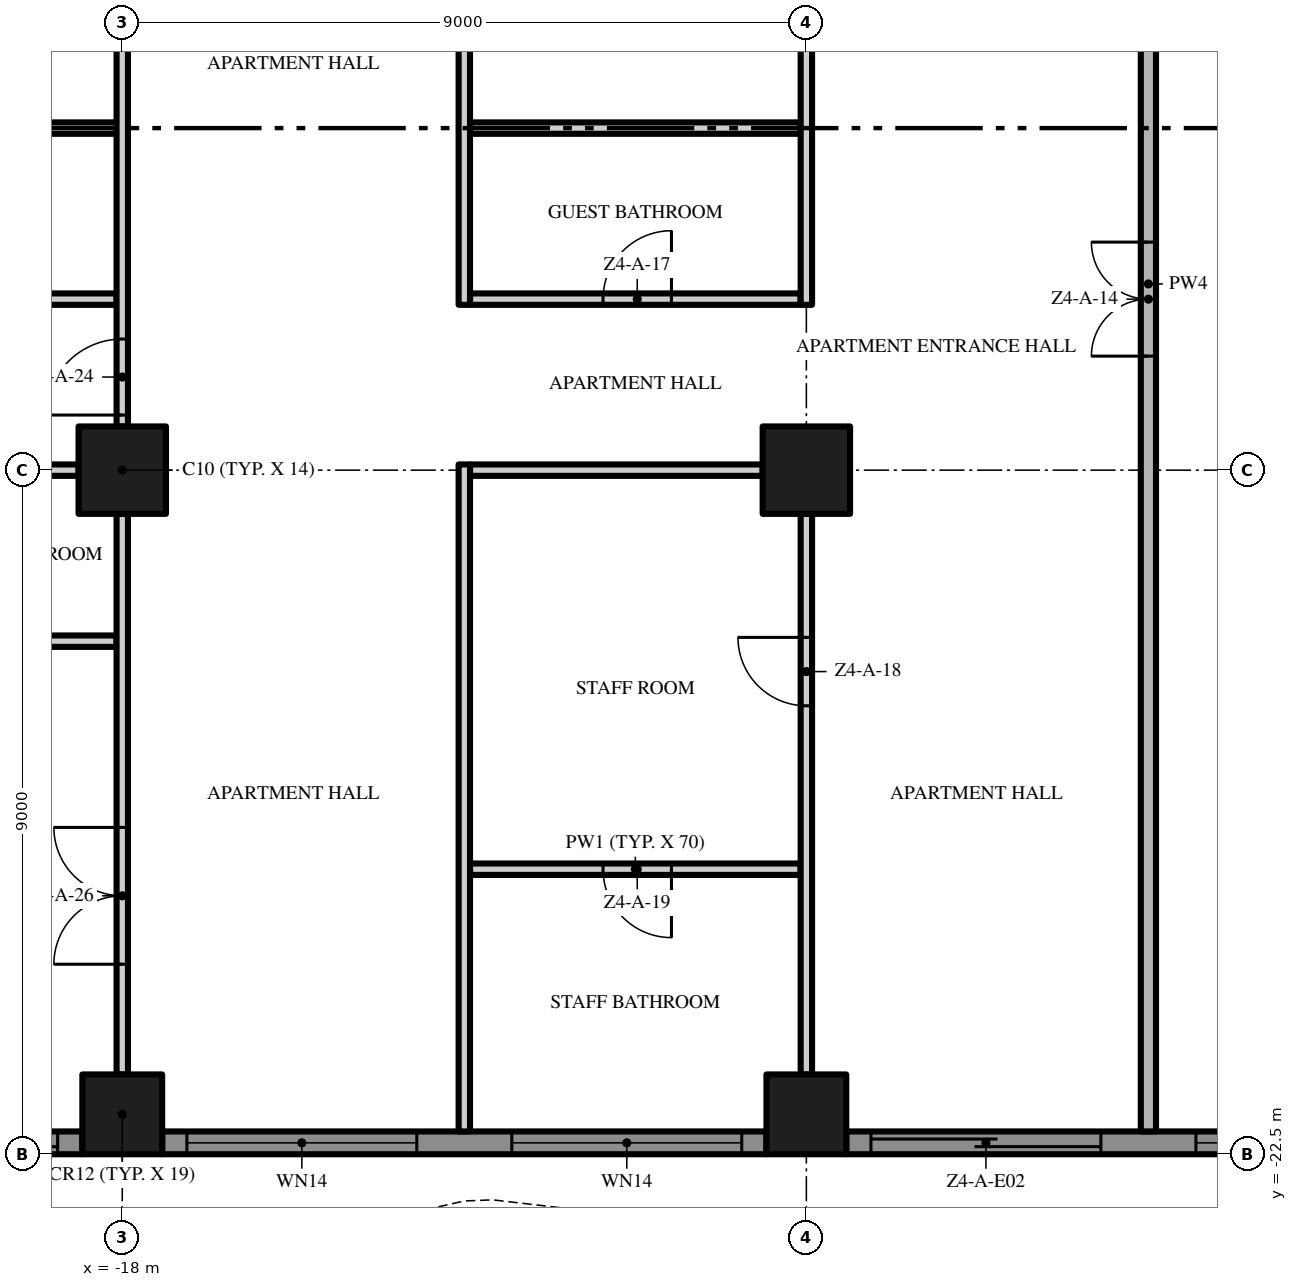
"""IFC4 building model, lengths in metres.
Left out: names, types, materials, properties, quantities, classifications, styles, units other than length and angle.
Written with IfcOpenShell. Run it as: python <this file> out.ifc"""

import sys

from ifc_helpers import new_model, si_unit, direction, frame, frame_2d, origin, origin_2d, place, context, subcontext, project, spatial, polyline, rectangle, outline, extrude, element, fill, save


model = new_model("IFC4")
c1 = context("Model", 3, precision=1e-05, world=origin(), true_north=direction((0.0, 1.0)))
c2 = subcontext(c1, "Body", "Model", "MODEL_VIEW")
j1 = project(units=[si_unit("LENGTHUNIT", "METRE"), si_unit("PLANEANGLEUNIT", "RADIAN")], contexts=[c1])
p1 = place(None, origin())
s1 = spatial("IfcSite", under=j1, at=p1, CompositionType="ELEMENT")
p2 = place(p1, origin())
s2 = spatial("IfcBuilding", under=s1, at=p2, CompositionType="ELEMENT")
p3 = place(p2, frame((0.0, 0.0, 184.4)))
s3 = spatial("IfcBuildingStorey", under=s2, at=p3, CompositionType="ELEMENT", Elevation=184.4)
p4 = place(p3, frame((-18.0, -13.5, 0.0), z_axis=(0.0, 0.0, 1.0), x_axis=(1.0, 0.0, 0.0)))
e1 = element("IfcColumn", 1, at=p4, inside=s3, PredefinedType="COLUMN", context=c2, shape_type="SweptSolid", body=[
    extrude(rectangle(XDim=1.15, YDim=1.15, at=origin_2d()), origin(), (0.0, 0.0, 1.0), 3.5),
])
p5 = place(p3, frame((-18.0, -21.975, 0.0), z_axis=(0.0, 0.0, 1.0), x_axis=(1.0, 0.0, 0.0)))
e2 = element("IfcColumn", 2, at=p5, inside=s3, PredefinedType="COLUMN", context=c2, shape_type="SweptSolid", body=[
    extrude(rectangle(XDim=1.05, YDim=1.05, at=origin_2d()), origin(), (0.0, 0.0, 1.0), 3.5),
])
p6 = place(p3, frame((-9.0, -13.5, 0.0), z_axis=(0.0, 0.0, 1.0), x_axis=(1.0, 0.0, 0.0)))
e3 = element("IfcColumn", 3, at=p6, inside=s3, PredefinedType="COLUMN", context=c2, shape_type="SweptSolid", body=[
    extrude(rectangle(XDim=1.15, YDim=1.15, at=origin_2d()), origin(), (0.0, 0.0, 1.0), 3.5),
])
p7 = place(p3, frame((-9.0, -21.975, 0.0), z_axis=(0.0, 0.0, 1.0), x_axis=(1.0, 0.0, 0.0)))
e4 = element("IfcColumn", 4, at=p7, inside=s3, PredefinedType="COLUMN", context=c2, shape_type="SweptSolid", body=[
    extrude(rectangle(XDim=1.05, YDim=1.05, at=origin_2d()), origin(), (0.0, 0.0, 1.0), 3.5),
])
p8 = place(p3, frame((-18.525, -22.35, 0.0), z_axis=(0.0, 0.0, 1.0), x_axis=(-1.0, 0.0, 0.0)))
e5 = element("IfcWall", 5, at=p8, inside=s3, PredefinedType="SOLIDWALL", context=c2, shape_type="SweptSolid", body=[
    extrude(rectangle(XDim=3.675, YDim=0.3, at=frame_2d((1.837, 0.0))), origin(), (0.0, 0.0, 1.0), 3.5),
])
p9 = place(p8, frame((0.325, 0.0, 0.0)))
e6 = element("IfcOpeningElement", 6, at=p9, cuts=e5, PredefinedType="OPENING", context=c2, shape_type="SweptSolid", body=[
    extrude(rectangle(XDim=3.025, YDim=2.4, at=frame_2d((1.512, 1.2))), frame((0.0, 0.16, 0.0), z_axis=(0.0, -1.0, 0.0), x_axis=(1.0, 0.0, 0.0)), (0.0, 0.0, 1.0), 0.32),
])
p10 = place(p3, frame((-9.525, -22.35, 0.0), z_axis=(0.0, 0.0, 1.0), x_axis=(-1.0, 0.0, 0.0)))
e7 = element("IfcWall", 7, at=p10, inside=s3, PredefinedType="SOLIDWALL", context=c2, shape_type="SweptSolid", body=[
    extrude(rectangle(XDim=7.95, YDim=0.3, at=frame_2d((3.975, 0.0))), origin(), (0.0, 0.0, 1.0), 3.5),
])
p11 = place(p10, frame((4.6, 0.0, 0.45)))
e8 = element("IfcOpeningElement", 8, at=p11, cuts=e7, PredefinedType="OPENING", context=c2, shape_type="SweptSolid", body=[
    extrude(rectangle(XDim=3.025, YDim=2.65, at=frame_2d((1.512, 1.325))), frame((0.0, 0.16, 0.0), z_axis=(0.0, -1.0, 0.0), x_axis=(1.0, 0.0, 0.0)), (0.0, 0.0, 1.0), 0.32),
])
p12 = place(p10, frame((0.325, 0.0, 0.45)))
e9 = element("IfcOpeningElement", 9, at=p12, cuts=e7, PredefinedType="OPENING", context=c2, shape_type="SweptSolid", body=[
    extrude(rectangle(XDim=3.025, YDim=2.65, at=frame_2d((1.512, 1.325))), frame((0.0, 0.16, 0.0), z_axis=(0.0, -1.0, 0.0), x_axis=(1.0, 0.0, 0.0)), (0.0, 0.0, 1.0), 0.32),
])
p13 = place(p3, frame((-0.525, -22.35, 0.0), z_axis=(0.0, 0.0, 1.0), x_axis=(-1.0, 0.0, 0.0)))
e10 = element("IfcWall", 10, at=p13, inside=s3, PredefinedType="SOLIDWALL", context=c2, shape_type="SweptSolid", body=[
    extrude(rectangle(XDim=7.95, YDim=0.3, at=frame_2d((3.975, 0.0))), origin(), (0.0, 0.0, 1.0), 3.5),
])
p14 = place(p13, frame((4.6, 0.0, 0.0)))
e11 = element("IfcOpeningElement", 11, at=p14, cuts=e10, PredefinedType="OPENING", context=c2, shape_type="SweptSolid", body=[
    extrude(rectangle(XDim=3.025, YDim=2.4, at=frame_2d((1.512, 1.2))), frame((0.0, 0.16, 0.0), z_axis=(0.0, -1.0, 0.0), x_axis=(1.0, 0.0, 0.0)), (0.0, 0.0, 1.0), 0.32),
])
p15 = place(p13, frame((0.325, 0.0, 0.45)))
e12 = element("IfcOpeningElement", 12, at=p15, cuts=e10, PredefinedType="OPENING", context=c2, shape_type="SweptSolid", body=[
    extrude(rectangle(XDim=3.025, YDim=2.65, at=frame_2d((1.512, 1.325))), frame((0.0, 0.16, 0.0), z_axis=(0.0, -1.0, 0.0), x_axis=(1.0, 0.0, 0.0)), (0.0, 0.0, 1.0), 0.32),
])
p16 = place(p3, origin())
e13 = element("IfcWall", 13, at=p16, inside=s3, PredefinedType="USERDEFINED", context=c2, shape_type="SweptSolid", body=[
    extrude(outline(polyline([(-22.5, -25.149), (-21.0, -25.485), (-20.625, -25.5), (-19.5, -25.369), (-18.0, -24.845), (-16.5, -24.112), (-15.0, -23.451), (-13.5, -23.115), (-13.125, -23.1), (-12.0, -23.231), (-10.5, -23.755), (-9.0, -24.488), (-7.5, -25.149), (-6.0, -25.485), (-5.625, -25.5), (-4.5, -25.369), (-3.0, -24.845), (-1.5, -24.112), (0.0, -23.451), (1.5, -23.115), (1.875, -23.1), (3.0, -23.231), (4.5, -23.755), (6.0, -24.488), (7.5, -25.149), (9.0, -25.485), (9.375, -25.5), (10.5, -25.369), (12.0, -24.845), (13.5, -24.112), (15.0, -23.451), (16.5, -23.115), (16.875, -23.1), (18.0, -23.231), (19.5, -23.755), (21.0, -24.488), (22.5, -25.149), (22.601, -24.92), (21.105, -24.261), (19.596, -23.524), (18.056, -22.986), (16.885, -22.849), (16.467, -22.866), (14.921, -23.213), (13.395, -23.885), (11.904, -24.614), (10.444, -25.124), (9.365, -25.249), (9.033, -25.236), (7.579, -24.91), (6.105, -24.261), (4.596, -23.524), (3.056, -22.986), (1.885, -22.849), (1.467, -22.866), (-0.079, -23.213), (-1.605, -23.885), (-3.096, -24.614), (-4.556, -25.124), (-5.635, -25.249), (-5.967, -25.236), (-7.421, -24.91), (-8.895, -24.261), (-10.404, -23.524), (-11.944, -22.986), (-13.115, -22.849), (-13.533, -22.866), (-15.079, -23.213), (-16.605, -23.885), (-18.096, -24.614), (-19.556, -25.124), (-20.635, -25.249), (-20.967, -25.236), (-22.445, -24.905), (-22.5, -25.149)])), origin(), (0.0, 0.0, 1.0), 0.9),
])
p17 = place(p3, frame((-9.075, -18.75, 0.0), z_axis=(0.0, 0.0, 1.0), x_axis=(-1.0, 0.0, 0.0)))
e14 = element("IfcWall", 14, at=p17, inside=s3, PredefinedType="PARTITIONING", context=c2, shape_type="SweptSolid", body=[
    extrude(rectangle(XDim=4.35, YDim=0.15, at=frame_2d((2.175, 0.0))), origin(), (0.0, 0.0, 1.0), 3.5),
])
p18 = place(p17, frame((1.7, 0.0, 0.0)))
e15 = element("IfcOpeningElement", 15, at=p18, cuts=e14, PredefinedType="OPENING", context=c2, shape_type="SweptSolid", body=[
    extrude(rectangle(XDim=0.9, YDim=2.1, at=frame_2d((0.45, 1.05))), frame((0.0, 0.085, 0.0), z_axis=(0.0, -1.0, 0.0), x_axis=(1.0, 0.0, 0.0)), (0.0, 0.0, 1.0), 0.17),
])
p19 = place(p3, frame((-20.925, -15.75, 0.0), z_axis=(0.0, 0.0, 1.0), x_axis=(1.0, 0.0, 0.0)))
e16 = element("IfcWall", 16, at=p19, inside=s3, PredefinedType="PARTITIONING", context=c2, shape_type="SweptSolid", body=[
    extrude(rectangle(XDim=2.85, YDim=0.15, at=frame_2d((1.425, 0.0))), origin(), (0.0, 0.0, 1.0), 3.5),
])
p20 = place(p3, frame((-25.95, -13.5, 0.0), z_axis=(0.0, 0.0, 1.0), x_axis=(1.0, 0.0, 0.0)))
e17 = element("IfcWall", 17, at=p20, inside=s3, PredefinedType="PARTITIONING", context=c2, shape_type="SweptSolid", body=[
    extrude(rectangle(XDim=7.375, YDim=0.15, at=frame_2d((3.688, 0.0))), origin(), (0.0, 0.0, 1.0), 3.5),
])
p21 = place(p3, frame((-13.425, -13.5, 0.0), z_axis=(0.0, 0.0, 1.0), x_axis=(1.0, 0.0, 0.0)))
e18 = element("IfcWall", 18, at=p21, inside=s3, PredefinedType="PARTITIONING", context=c2, shape_type="SweptSolid", body=[
    extrude(rectangle(XDim=3.85, YDim=0.15, at=frame_2d((1.925, 0.0))), origin(), (0.0, 0.0, 1.0), 3.5),
])
p22 = place(p3, frame((-20.925, -11.25, 0.0), z_axis=(0.0, 0.0, 1.0), x_axis=(1.0, 0.0, 0.0)))
e19 = element("IfcWall", 19, at=p22, inside=s3, PredefinedType="PARTITIONING", context=c2, shape_type="SweptSolid", body=[
    extrude(rectangle(XDim=2.85, YDim=0.15, at=frame_2d((1.425, 0.0))), origin(), (0.0, 0.0, 1.0), 3.5),
])
p23 = place(p3, frame((-13.425, -11.25, 0.0), z_axis=(0.0, 0.0, 1.0), x_axis=(1.0, 0.0, 0.0)))
e20 = element("IfcWall", 20, at=p23, inside=s3, PredefinedType="PARTITIONING", context=c2, shape_type="SweptSolid", body=[
    extrude(rectangle(XDim=4.35, YDim=0.15, at=frame_2d((2.175, 0.0))), origin(), (0.0, 0.0, 1.0), 3.5),
])
p24 = place(p23, frame((1.75, 0.0, 0.0)))
e21 = element("IfcOpeningElement", 21, at=p24, cuts=e20, PredefinedType="OPENING", context=c2, shape_type="SweptSolid", body=[
    extrude(rectangle(XDim=0.9, YDim=2.1, at=frame_2d((0.45, 1.05))), frame((0.0, 0.085, 0.0), z_axis=(0.0, -1.0, 0.0), x_axis=(1.0, 0.0, 0.0)), (0.0, 0.0, 1.0), 0.17),
])
p25 = place(p3, frame((-20.925, -9.0, 0.0), z_axis=(0.0, 0.0, 1.0), x_axis=(1.0, 0.0, 0.0)))
e22 = element("IfcWall", 22, at=p25, inside=s3, PredefinedType="PARTITIONING", context=c2, shape_type="SweptSolid", body=[
    extrude(rectangle(XDim=2.85, YDim=0.15, at=frame_2d((1.425, 0.0))), origin(), (0.0, 0.0, 1.0), 3.5),
])
p26 = place(p3, frame((-13.425, -9.0, 0.0), z_axis=(0.0, 0.0, 1.0), x_axis=(1.0, 0.0, 0.0)))
e23 = element("IfcWall", 23, at=p26, inside=s3, PredefinedType="PARTITIONING", context=c2, shape_type="SweptSolid", body=[
    extrude(rectangle(XDim=4.35, YDim=0.15, at=frame_2d((2.175, 0.0))), origin(), (0.0, 0.0, 1.0), 3.5),
])
p27 = place(p3, frame((-18.0, -21.45, 0.0), z_axis=(0.0, 0.0, 1.0), x_axis=(0.0, 1.0, 0.0)))
e24 = element("IfcWall", 24, at=p27, inside=s3, PredefinedType="PARTITIONING", context=c2, shape_type="SweptSolid", body=[
    extrude(rectangle(XDim=7.375, YDim=0.15, at=frame_2d((3.688, 0.0))), origin(), (0.0, 0.0, 1.0), 3.5),
])
p28 = place(p27, frame((1.45, 0.0, 0.0)))
e25 = element("IfcOpeningElement", 25, at=p28, cuts=e24, PredefinedType="OPENING", context=c2, shape_type="SweptSolid", body=[
    extrude(rectangle(XDim=1.8, YDim=2.4, at=frame_2d((0.9, 1.2))), frame((0.0, 0.085, 0.0), z_axis=(0.0, -1.0, 0.0), x_axis=(1.0, 0.0, 0.0)), (0.0, 0.0, 1.0), 0.17),
])
p29 = place(p3, frame((-18.0, -12.925, 0.0), z_axis=(0.0, 0.0, 1.0), x_axis=(0.0, 1.0, 0.0)))
e26 = element("IfcWall", 26, at=p29, inside=s3, PredefinedType="PARTITIONING", context=c2, shape_type="SweptSolid", body=[
    extrude(rectangle(XDim=7.85, YDim=0.15, at=frame_2d((3.925, 0.0))), origin(), (0.0, 0.0, 1.0), 3.5),
])
p30 = place(p29, frame((6.7, 0.0, 0.0)))
e27 = element("IfcOpeningElement", 27, at=p30, cuts=e26, PredefinedType="OPENING", context=c2, shape_type="SweptSolid", body=[
    extrude(rectangle(XDim=1.0, YDim=2.4, at=frame_2d((0.5, 1.2))), frame((0.0, 0.085, 0.0), z_axis=(0.0, -1.0, 0.0), x_axis=(1.0, 0.0, 0.0)), (0.0, 0.0, 1.0), 0.17),
])
p31 = place(p29, frame((0.15, 0.0, 0.0)))
e28 = element("IfcOpeningElement", 28, at=p31, cuts=e26, PredefinedType="OPENING", context=c2, shape_type="SweptSolid", body=[
    extrude(rectangle(XDim=1.0, YDim=2.4, at=frame_2d((0.5, 1.2))), frame((0.0, 0.085, 0.0), z_axis=(0.0, -1.0, 0.0), x_axis=(1.0, 0.0, 0.0)), (0.0, 0.0, 1.0), 0.17),
])
p32 = place(p3, frame((-13.5, -22.2, 0.0), z_axis=(0.0, 0.0, 1.0), x_axis=(0.0, 1.0, 0.0)))
e29 = element("IfcWall", 29, at=p32, inside=s3, PredefinedType="PARTITIONING", context=c2, shape_type="SweptSolid", body=[
    extrude(rectangle(XDim=8.775, YDim=0.15, at=frame_2d((4.388, 0.0))), origin(), (0.0, 0.0, 1.0), 3.5),
])
p33 = place(p3, frame((-13.5, -11.325, 0.0), z_axis=(0.0, 0.0, 1.0), x_axis=(0.0, 1.0, 0.0)))
e30 = element("IfcWall", 30, at=p33, inside=s3, PredefinedType="PARTITIONING", context=c2, shape_type="SweptSolid", body=[
    extrude(rectangle(XDim=11.225, YDim=0.15, at=frame_2d((5.612, 0.0))), origin(), (0.0, 0.0, 1.0), 3.5),
])
p34 = place(p3, frame((-9.0, -21.45, 0.0), z_axis=(0.0, 0.0, 1.0), x_axis=(0.0, 1.0, 0.0)))
e31 = element("IfcWall", 31, at=p34, inside=s3, PredefinedType="PARTITIONING", context=c2, shape_type="SweptSolid", body=[
    extrude(rectangle(XDim=7.375, YDim=0.15, at=frame_2d((3.688, 0.0))), origin(), (0.0, 0.0, 1.0), 3.5),
])
p35 = place(p34, frame((4.85, 0.0, 0.0)))
e32 = element("IfcOpeningElement", 32, at=p35, cuts=e31, PredefinedType="OPENING", context=c2, shape_type="SweptSolid", body=[
    extrude(rectangle(XDim=0.9, YDim=2.1, at=frame_2d((0.45, 1.05))), frame((0.0, 0.085, 0.0), z_axis=(0.0, -1.0, 0.0), x_axis=(1.0, 0.0, 0.0)), (0.0, 0.0, 1.0), 0.17),
])
p36 = place(p3, frame((-9.0, -11.325, 0.0), z_axis=(0.0, 0.0, 1.0), x_axis=(0.0, 1.0, 0.0)))
e33 = element("IfcWall", 33, at=p36, inside=s3, PredefinedType="PARTITIONING", context=c2, shape_type="SweptSolid", body=[
    extrude(rectangle(XDim=6.25, YDim=0.15, at=frame_2d((3.125, 0.0))), origin(), (0.0, 0.0, 1.0), 3.5),
])
p37 = place(p36, frame((4.825, 0.0, 0.0)))
e34 = element("IfcOpeningElement", 34, at=p37, cuts=e33, PredefinedType="OPENING", context=c2, shape_type="SweptSolid", body=[
    extrude(rectangle(XDim=1.0, YDim=2.4, at=frame_2d((0.5, 1.2))), frame((0.0, 0.085, 0.0), z_axis=(0.0, -1.0, 0.0), x_axis=(1.0, 0.0, 0.0)), (0.0, 0.0, 1.0), 0.17),
])
p38 = place(p3, frame((-4.5, -22.2, 0.0), z_axis=(0.0, 0.0, 1.0), x_axis=(0.0, 1.0, 0.0)))
e35 = element("IfcWall", 35, at=p38, inside=s3, PredefinedType="PARTITIONING", context=c2, shape_type="SweptSolid", body=[
    extrude(rectangle(XDim=22.3, YDim=0.2, at=frame_2d((11.15, 0.0))), origin(), (0.0, 0.0, 1.0), 3.5),
])
p39 = place(p38, frame((10.2, 0.0, 0.0)))
e36 = element("IfcOpeningElement", 36, at=p39, cuts=e35, PredefinedType="OPENING", context=c2, shape_type="SweptSolid", body=[
    extrude(rectangle(XDim=1.5, YDim=2.4, at=frame_2d((0.75, 1.2))), frame((0.0, 0.11, 0.0), z_axis=(0.0, -1.0, 0.0), x_axis=(1.0, 0.0, 0.0)), (0.0, 0.0, 1.0), 0.22),
])
p40 = place(p9, origin())
e37 = element("IfcDoor", 37, at=p40, inside=s3, OperationType="SINGLE_SWING_LEFT", PredefinedType="DOOR", context=c2, shape_type="SweptSolid", body=[
    extrude(rectangle(XDim=3.025, YDim=2.4, at=frame_2d((1.512, 1.2))), frame((0.0, 0.025, 0.0), z_axis=(0.0, -1.0, 0.0), x_axis=(1.0, 0.0, 0.0)), (0.0, 0.0, 1.0), 0.05),
])
fill(e6, e37)
p41 = place(p11, origin())
e38 = element("IfcWindow", 38, at=p41, inside=s3, PartitioningType="SINGLE_PANEL", PredefinedType="WINDOW", context=c2, shape_type="SweptSolid", body=[
    extrude(rectangle(XDim=3.025, YDim=2.65, at=frame_2d((1.512, 1.325))), frame((0.0, 0.03, 0.0), z_axis=(0.0, -1.0, 0.0), x_axis=(1.0, 0.0, 0.0)), (0.0, 0.0, 1.0), 0.06),
])
fill(e8, e38)
p42 = place(p12, origin())
e39 = element("IfcWindow", 39, at=p42, inside=s3, PartitioningType="SINGLE_PANEL", PredefinedType="WINDOW", context=c2, shape_type="SweptSolid", body=[
    extrude(rectangle(XDim=3.025, YDim=2.65, at=frame_2d((1.512, 1.325))), frame((0.0, 0.03, 0.0), z_axis=(0.0, -1.0, 0.0), x_axis=(1.0, 0.0, 0.0)), (0.0, 0.0, 1.0), 0.06),
])
fill(e9, e39)
p43 = place(p14, origin())
e40 = element("IfcDoor", 40, at=p43, inside=s3, OperationType="SINGLE_SWING_LEFT", PredefinedType="DOOR", context=c2, shape_type="SweptSolid", body=[
    extrude(rectangle(XDim=3.025, YDim=2.4, at=frame_2d((1.512, 1.2))), frame((0.0, 0.025, 0.0), z_axis=(0.0, -1.0, 0.0), x_axis=(1.0, 0.0, 0.0)), (0.0, 0.0, 1.0), 0.05),
])
fill(e11, e40)
p44 = place(p15, origin())
e41 = element("IfcWindow", 41, at=p44, inside=s3, PartitioningType="SINGLE_PANEL", PredefinedType="WINDOW", context=c2, shape_type="SweptSolid", body=[
    extrude(rectangle(XDim=3.025, YDim=2.65, at=frame_2d((1.512, 1.325))), frame((0.0, 0.03, 0.0), z_axis=(0.0, -1.0, 0.0), x_axis=(1.0, 0.0, 0.0)), (0.0, 0.0, 1.0), 0.06),
])
fill(e12, e41)
p45 = place(p39, origin())
e42 = element("IfcDoor", 42, at=p45, inside=s3, OperationType="DOUBLE_DOOR_SINGLE_SWING", PredefinedType="DOOR", context=c2, shape_type="SweptSolid", body=[
    extrude(rectangle(XDim=1.5, YDim=2.4, at=frame_2d((0.75, 1.2))), frame((0.0, 0.025, 0.0), z_axis=(0.0, -1.0, 0.0), x_axis=(1.0, 0.0, 0.0)), (0.0, 0.0, 1.0), 0.05),
])
fill(e36, e42)
p46 = place(p24, origin())
e43 = element("IfcDoor", 43, at=p46, inside=s3, OperationType="SINGLE_SWING_RIGHT", PredefinedType="DOOR", context=c2, shape_type="SweptSolid", body=[
    extrude(rectangle(XDim=0.9, YDim=2.1, at=frame_2d((0.45, 1.05))), frame((0.0, 0.025, 0.0), z_axis=(0.0, -1.0, 0.0), x_axis=(1.0, 0.0, 0.0)), (0.0, 0.0, 1.0), 0.05),
])
fill(e21, e43)
p47 = place(p35, origin())
e44 = element("IfcDoor", 44, at=p47, inside=s3, OperationType="SINGLE_SWING_RIGHT", PredefinedType="DOOR", context=c2, shape_type="SweptSolid", body=[
    extrude(rectangle(XDim=0.9, YDim=2.1, at=frame_2d((0.45, 1.05))), frame((0.0, 0.025, 0.0), z_axis=(0.0, -1.0, 0.0), x_axis=(1.0, 0.0, 0.0)), (0.0, 0.0, 1.0), 0.05),
])
fill(e32, e44)
p48 = place(p18, origin())
e45 = element("IfcDoor", 45, at=p48, inside=s3, OperationType="SINGLE_SWING_LEFT", PredefinedType="DOOR", context=c2, shape_type="SweptSolid", body=[
    extrude(rectangle(XDim=0.9, YDim=2.1, at=frame_2d((0.45, 1.05))), frame((0.0, 0.025, 0.0), z_axis=(0.0, -1.0, 0.0), x_axis=(1.0, 0.0, 0.0)), (0.0, 0.0, 1.0), 0.05),
])
fill(e15, e45)
p49 = place(p31, origin())
e46 = element("IfcDoor", 46, at=p49, inside=s3, OperationType="SINGLE_SWING_LEFT", PredefinedType="DOOR", context=c2, shape_type="SweptSolid", body=[
    extrude(rectangle(XDim=1.0, YDim=2.4, at=frame_2d((0.5, 1.2))), frame((0.0, 0.025, 0.0), z_axis=(0.0, -1.0, 0.0), x_axis=(1.0, 0.0, 0.0)), (0.0, 0.0, 1.0), 0.05),
])
fill(e28, e46)
p50 = place(p28, origin())
e47 = element("IfcDoor", 47, at=p50, inside=s3, OperationType="DOUBLE_DOOR_SINGLE_SWING", PredefinedType="DOOR", context=c2, shape_type="SweptSolid", body=[
    extrude(rectangle(XDim=1.8, YDim=2.4, at=frame_2d((0.9, 1.2))), frame((0.0, 0.025, 0.0), z_axis=(0.0, -1.0, 0.0), x_axis=(1.0, 0.0, 0.0)), (0.0, 0.0, 1.0), 0.05),
])
fill(e25, e47)
save(model, sys.argv[1])
